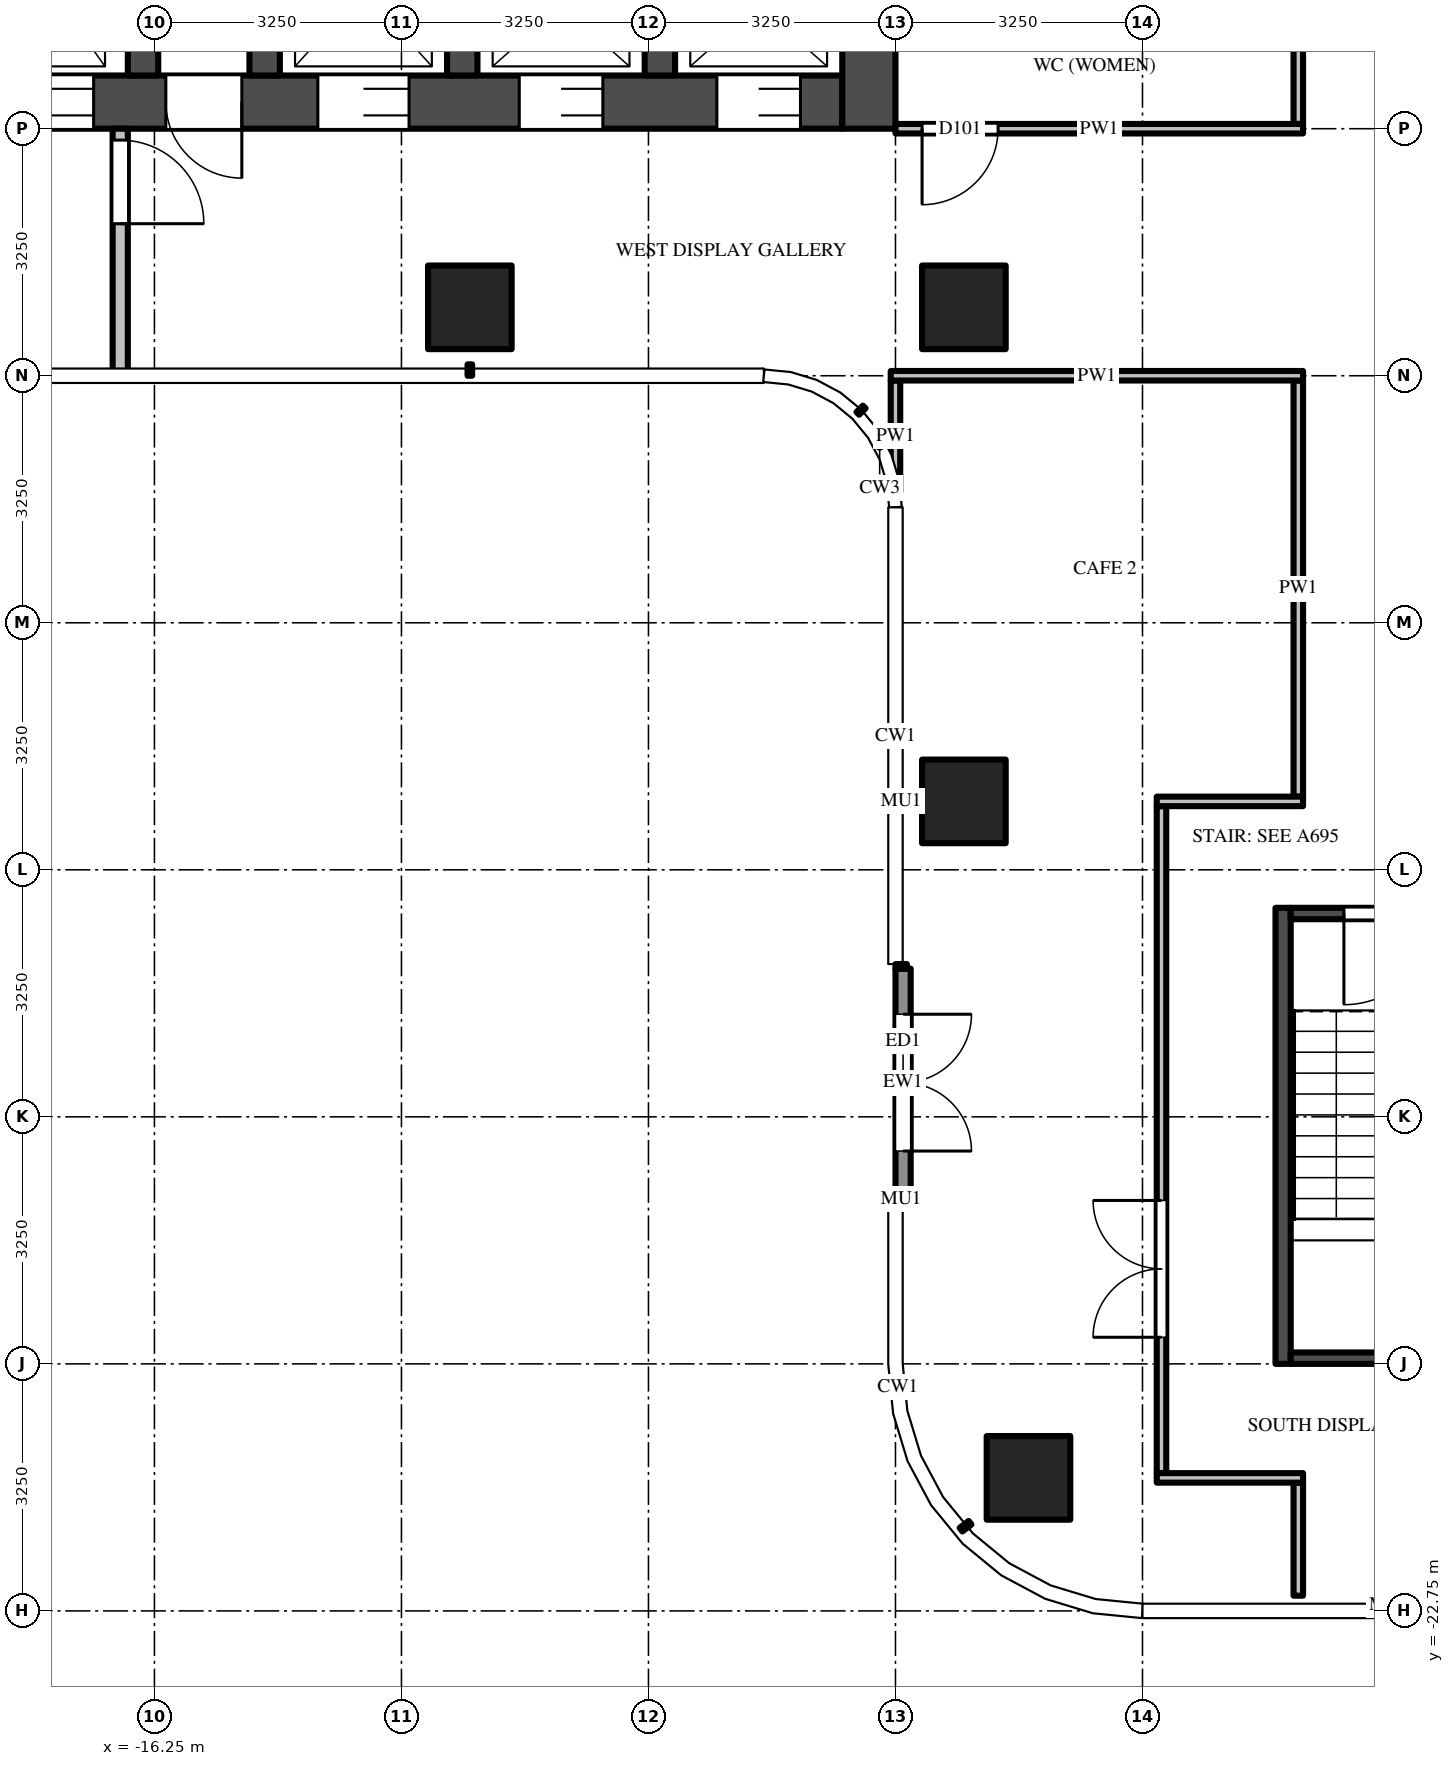
"""IFC4 building model, lengths in metres.
Left out: names, types, materials, properties, quantities, classifications, styles, units other than length and angle.
Written with IfcOpenShell. Run it as: python <this file> out.ifc"""

import sys

from ifc_helpers import new_model, si_unit, direction, frame, frame_2d, origin, origin_2d, place, context, subcontext, project, spatial, polyline, rectangle, outline, extrude, source, transform, mapped, element, fill, save


model = new_model("IFC4")
c1 = context("Model", 3, precision=1e-05, world=origin(), true_north=direction((0.0, 1.0)))
c2 = subcontext(c1, "Body", "Model", "MODEL_VIEW")
j1 = project(units=[si_unit("LENGTHUNIT", "METRE"), si_unit("PLANEANGLEUNIT", "RADIAN")], contexts=[c1])
p1 = place(None, origin())
s1 = spatial("IfcSite", under=j1, at=p1, CompositionType="ELEMENT")
p2 = place(p1, origin())
s2 = spatial("IfcBuilding", under=s1, at=p2, CompositionType="ELEMENT")
p3 = place(p2, frame((0.0, 0.0, 248.0)))
s3 = spatial("IfcBuildingStorey", under=s2, at=p3, CompositionType="ELEMENT", Elevation=248.0)
m1 = source(origin(), c2, "Body", "SweptSolid", [
    extrude(rectangle(XDim=1.1, YDim=1.1, at=origin_2d()), origin(), (0.0, 0.0, 1.0), 3.9),
])
for number, where, z_axis, x_axis in (
    (1, (-5.6, -5.6, 0.0), (0.0, 0.0, 1.0), (1.0, 0.0, 0.0)),
    (2, (-5.6, -12.1, 0.0), (0.0, 0.0, 1.0), (1.0, 0.0, 0.0)),
    (3, (-4.75, -21.0, 0.0), (0.0, 0.0, 1.0), (1.0, 0.0, 0.0)),
    (4, (-12.1, -5.6, 0.0), (0.0, 0.0, 1.0), (1.0, 0.0, 0.0)),
):
    element("IfcColumn", number, at=place(p3, frame(where, z_axis=z_axis, x_axis=x_axis)), inside=s3, PredefinedType="COLUMN", context=c2, shape_type="MappedRepresentation", body=[
        mapped(m1, transform((0.0, 0.0, 0.0))),
    ])
m2 = source(origin(), c2, "Body", "SweptSolid", [
    extrude(rectangle(XDim=14.85, YDim=0.7, at=frame_2d((7.425, 0.0))), origin(), (0.0, 0.0, 1.0), 3.7),
])
p4 = place(p3, frame((-7.2, -2.9, 0.0), z_axis=(0.0, 0.0, 1.0), x_axis=(-1.0, 0.0, 0.0)))
e5 = element("IfcWall", 5, at=p4, inside=s3, PredefinedType="SHEAR", context=c2, shape_type="MappedRepresentation", body=[
    mapped(m2, transform((0.0, 0.0, 0.0))),
])
m3 = source(origin(), c2, "Body", "SweptSolid", [
    extrude(rectangle(XDim=1.1, YDim=2.1, at=frame_2d((0.55, 1.05))), frame((0.0, 0.36, 0.0), z_axis=(0.0, -1.0, 0.0), x_axis=(1.0, 0.0, 0.0)), (0.0, 0.0, 1.0), 0.72),
])
p5 = place(p4, frame((0.55, 0.0, 0.0)))
e6 = element("IfcOpeningElement", 6, at=p5, cuts=e5, PredefinedType="OPENING", context=c2, shape_type="MappedRepresentation", body=[
    mapped(m3, transform((0.0, 0.0, 0.0))),
])
p6 = place(p4, frame((3.15, 0.0, 0.0)))
e7 = element("IfcOpeningElement", 7, at=p6, cuts=e5, PredefinedType="OPENING", context=c2, shape_type="MappedRepresentation", body=[
    mapped(m3, transform((0.0, 0.0, 0.0))),
])
m4 = source(origin(), c2, "Body", "SweptSolid", [
    extrude(rectangle(XDim=1.2, YDim=2.1, at=frame_2d((0.6, 1.05))), frame((0.0, 0.36, 0.0), z_axis=(0.0, -1.0, 0.0), x_axis=(1.0, 0.0, 0.0)), (0.0, 0.0, 1.0), 0.72),
])
p7 = place(p4, frame((5.7, 0.0, 0.0)))
e8 = element("IfcOpeningElement", 8, at=p7, cuts=e5, PredefinedType="OPENING", context=c2, shape_type="MappedRepresentation", body=[
    mapped(m4, transform((0.0, 0.0, 0.0))),
])
m5 = source(origin(), c2, "Body", "SweptSolid", [
    extrude(rectangle(XDim=1.3, YDim=2.1, at=frame_2d((0.65, 1.05))), frame((0.0, 0.36, 0.0), z_axis=(0.0, -1.0, 0.0), x_axis=(1.0, 0.0, 0.0)), (0.0, 0.0, 1.0), 0.72),
])
p8 = place(p4, frame((12.2, 0.0, 0.0)))
e9 = element("IfcOpeningElement", 9, at=p8, cuts=e5, PredefinedType="OPENING", context=c2, shape_type="MappedRepresentation", body=[
    mapped(m5, transform((0.0, 0.0, 0.0))),
])
p9 = place(p4, frame((9.85, 0.0, 0.0)))
e10 = element("IfcOpeningElement", 10, at=p9, cuts=e5, PredefinedType="OPENING", context=c2, shape_type="MappedRepresentation", body=[
    mapped(m4, transform((0.0, 0.0, 0.0))),
])
m6 = source(origin(), c2, "Body", "SweptSolid", [
    extrude(rectangle(XDim=1.0, YDim=2.1, at=frame_2d((0.5, 1.05))), frame((0.0, 0.36, 0.0), z_axis=(0.0, -1.0, 0.0), x_axis=(1.0, 0.0, 0.0)), (0.0, 0.0, 1.0), 0.72),
])
p10 = place(p4, frame((7.9, 0.0, 0.0)))
e11 = element("IfcOpeningElement", 11, at=p10, cuts=e5, PredefinedType="OPENING", context=c2, shape_type="MappedRepresentation", body=[
    mapped(m6, transform((0.0, 0.0, 0.0))),
])
m7 = source(origin(), c2, "Body", "SweptSolid", [
    extrude(rectangle(XDim=9.05, YDim=0.7, at=frame_2d((4.525, 0.0))), origin(), (0.0, 0.0, 1.0), 3.7),
])
p11 = place(p3, frame((-6.85, 5.8, 0.0), z_axis=(0.0, 0.0, 1.0), x_axis=(0.0, -1.0, 0.0)))
e12 = element("IfcWall", 12, at=p11, inside=s3, PredefinedType="SHEAR", context=c2, shape_type="MappedRepresentation", body=[
    mapped(m7, transform((0.0, 0.0, 0.0))),
])
m8 = source(origin(), c2, "Body", "SweptSolid", [
    extrude(rectangle(XDim=1.8, YDim=2.1, at=frame_2d((0.9, 1.05))), frame((0.0, 0.36, 0.0), z_axis=(0.0, -1.0, 0.0), x_axis=(1.0, 0.0, 0.0)), (0.0, 0.0, 1.0), 0.72),
])
p12 = place(p11, frame((3.15, 0.0, 0.0)))
e13 = element("IfcOpeningElement", 13, at=p12, cuts=e12, PredefinedType="OPENING", context=c2, shape_type="MappedRepresentation", body=[
    mapped(m8, transform((0.0, 0.0, 0.0))),
])
m9 = source(origin(), c2, "Body", "SweptSolid", [
    extrude(rectangle(XDim=2.45, YDim=0.4, at=frame_2d((1.225, 0.0))), origin(), (0.0, 0.0, 1.0), 3.7),
])
for number, where, z_axis, x_axis in (
    (14, (-9.6, -0.1, 0.0), (0.0, 0.0, 1.0), (0.0, -1.0, 0.0)),
    (15, (-12.2, -0.1, 0.0), (0.0, 0.0, 1.0), (0.0, -1.0, 0.0)),
    (16, (-14.8, -0.1, 0.0), (0.0, 0.0, 1.0), (0.0, -1.0, 0.0)),
    (17, (-16.4, -0.1, 0.0), (0.0, 0.0, 1.0), (0.0, -1.0, 0.0)),
):
    element("IfcWall", number, at=place(p3, frame(where, z_axis=z_axis, x_axis=x_axis)), inside=s3, PredefinedType="SHEAR", context=c2, shape_type="MappedRepresentation", body=[
        mapped(m9, transform((0.0, 0.0, 0.0))),
    ])
m10 = source(origin(), c2, "Body", "SweptSolid", [
    extrude(rectangle(XDim=3.25, YDim=0.2, at=frame_2d((1.625, 0.0))), origin(), (0.0, 0.0, 1.0), 3.7),
])
p13 = place(p3, frame((-16.7, -3.25, 0.0), z_axis=(0.0, 0.0, 1.0), x_axis=(0.0, -1.0, 0.0)))
e18 = element("IfcWall", 18, at=p13, inside=s3, PredefinedType="PARTITIONING", context=c2, shape_type="MappedRepresentation", body=[
    mapped(m10, transform((0.0, 0.0, 0.0))),
])
m11 = source(origin(), c2, "Body", "SweptSolid", [
    extrude(rectangle(XDim=1.1, YDim=2.1, at=frame_2d((0.55, 1.05))), frame((0.0, 0.11, 0.0), z_axis=(0.0, -1.0, 0.0), x_axis=(1.0, 0.0, 0.0)), (0.0, 0.0, 1.0), 0.22),
])
p14 = place(p13, frame((0.15, 0.0, 0.0)))
e19 = element("IfcOpeningElement", 19, at=p14, cuts=e18, PredefinedType="OPENING", context=c2, shape_type="MappedRepresentation", body=[
    mapped(m11, transform((0.0, 0.0, 0.0))),
])
m12 = source(origin(), c2, "Body", "SweptSolid", [
    extrude(rectangle(XDim=6.0, YDim=0.2, at=frame_2d((3.0, 0.0))), origin(), (0.0, 0.0, 1.0), 3.7),
])
p15 = place(p3, frame((-1.4, -13.5, 0.0), z_axis=(0.0, 0.0, 1.0), x_axis=(0.0, -1.0, 0.0)))
e20 = element("IfcWall", 20, at=p15, inside=s3, PredefinedType="SHEAR", context=c2, shape_type="MappedRepresentation", body=[
    mapped(m12, transform((0.0, 0.0, 0.0))),
])
m13 = source(origin(), c2, "Body", "SweptSolid", [
    extrude(rectangle(XDim=2.6, YDim=0.15, at=frame_2d((1.3, 0.0))), origin(), (0.0, 0.0, 1.0), 3.7),
])
p16 = place(p3, frame((1.3, -13.575, 0.0), z_axis=(0.0, 0.0, 1.0), x_axis=(-1.0, 0.0, 0.0)))
e21 = element("IfcWall", 21, at=p16, inside=s3, PredefinedType="SHEAR", context=c2, shape_type="MappedRepresentation", body=[
    mapped(m13, transform((0.0, 0.0, 0.0))),
])
m14 = source(origin(), c2, "Body", "SweptSolid", [
    extrude(rectangle(XDim=1.2, YDim=2.1, at=frame_2d((0.6, 1.05))), frame((0.0, 0.085, 0.0), z_axis=(0.0, -1.0, 0.0), x_axis=(1.0, 0.0, 0.0)), (0.0, 0.0, 1.0), 0.17),
])
p17 = place(p16, frame((0.7, 0.0, 0.0)))
e22 = element("IfcOpeningElement", 22, at=p17, cuts=e21, PredefinedType="OPENING", context=c2, shape_type="MappedRepresentation", body=[
    mapped(m14, transform((0.0, 0.0, 0.0))),
])
p18 = place(p3, frame((1.3, -19.425, 0.0), z_axis=(0.0, 0.0, 1.0), x_axis=(-1.0, 0.0, 0.0)))
e23 = element("IfcWall", 23, at=p18, inside=s3, PredefinedType="SHEAR", context=c2, shape_type="MappedRepresentation", body=[
    mapped(m13, transform((0.0, 0.0, 0.0))),
])
m15 = source(origin(), c2, "Body", "SweptSolid", [
    extrude(rectangle(XDim=3.0, YDim=0.2, at=frame_2d((1.5, 0.0))), origin(), (0.0, 0.0, 1.0), 3.7),
])
p19 = place(p3, frame((-6.4, -14.3, 0.0), z_axis=(0.0, 0.0, 1.0), x_axis=(0.0, -1.0, 0.0)))
e24 = element("IfcWall", 24, at=p19, inside=s3, PredefinedType="SOLIDWALL", context=c2, shape_type="MappedRepresentation", body=[
    mapped(m15, transform((0.0, 0.0, 0.0))),
])
m16 = source(origin(), c2, "Body", "SweptSolid", [
    extrude(rectangle(XDim=1.8, YDim=2.4, at=frame_2d((0.9, 1.2))), frame((0.0, 0.11, 0.0), z_axis=(0.0, -1.0, 0.0), x_axis=(1.0, 0.0, 0.0)), (0.0, 0.0, 1.0), 0.22),
])
p20 = place(p19, frame((0.6, 0.0, 0.0)))
e25 = element("IfcOpeningElement", 25, at=p20, cuts=e24, PredefinedType="OPENING", context=c2, shape_type="MappedRepresentation", body=[
    mapped(m16, transform((0.0, 0.0, 0.0))),
])
p21 = place(p3, origin())
e26 = element("IfcWall", 26, at=p21, inside=s3, PredefinedType="USERDEFINED", context=c2, shape_type="SweptSolid", body=[
    extrude(outline(polyline([(-16.429, -8.882), (-17.351, -8.859), (-18.106, -8.693), (-17.977, -8.107), (-17.279, -8.26), (-16.473, -8.281), (-15.681, -8.143), (-15.603, -8.116), (-15.409, -8.684), (-15.532, -8.726), (-16.429, -8.882)])), origin(), (0.0, 0.0, 1.0), 0.5),
])
m17 = source(origin(), c2, "Body", "SweptSolid", [
    extrude(rectangle(XDim=1.469, YDim=0.125, at=frame_2d((0.734, 0.0))), origin(), (0.0, 0.0, 1.0), 3.7),
])
p22 = place(p3, frame((-6.5, -6.562, 0.0), z_axis=(0.0, 0.0, 1.0), x_axis=(0.0, -1.0, 0.0)))
e27 = element("IfcWall", 27, at=p22, inside=s3, PredefinedType="PARTITIONING", context=c2, shape_type="MappedRepresentation", body=[
    mapped(m17, transform((0.0, 0.0, 0.0))),
])
m18 = source(origin(), c2, "Body", "SweptSolid", [
    extrude(rectangle(XDim=8.775, YDim=0.125, at=frame_2d((4.387, 0.0))), origin(), (0.0, 0.0, 1.0), 2.78),
])
p23 = place(p3, frame((-3.0, -20.938, 0.0), z_axis=(0.0, 0.0, 1.0), x_axis=(0.0, 1.0, 0.0)))
e28 = element("IfcWall", 28, at=p23, inside=s3, PredefinedType="PARTITIONING", context=c2, shape_type="MappedRepresentation", body=[
    mapped(m18, transform((0.0, 0.0, 0.0))),
])
m19 = source(origin(), c2, "Body", "SweptSolid", [
    extrude(rectangle(XDim=1.8, YDim=2.1, at=frame_2d((0.9, 1.05))), frame((0.0, 0.073, 0.0), z_axis=(0.0, -1.0, 0.0), x_axis=(1.0, 0.0, 0.0)), (0.0, 0.0, 1.0), 0.145),
])
p24 = place(p23, frame((1.788, 0.0, 0.0)))
e29 = element("IfcOpeningElement", 29, at=p24, cuts=e28, PredefinedType="OPENING", context=c2, shape_type="MappedRepresentation", body=[
    mapped(m19, transform((0.0, 0.0, 0.0))),
])
m20 = source(origin(), c2, "Body", "SweptSolid", [
    extrude(rectangle(XDim=1.488, YDim=0.125, at=frame_2d((0.744, 0.0))), origin(), (0.0, 0.0, 1.0), 2.78),
])
p25 = place(p3, frame((-1.2, -21.062, 0.0), z_axis=(0.0, 0.0, 1.0), x_axis=(0.0, -1.0, 0.0)))
e30 = element("IfcWall", 30, at=p25, inside=s3, PredefinedType="PARTITIONING", context=c2, shape_type="MappedRepresentation", body=[
    mapped(m20, transform((0.0, 0.0, 0.0))),
])
m21 = source(origin(), c2, "Body", "SweptSolid", [
    extrude(rectangle(XDim=5.475, YDim=0.125, at=frame_2d((2.738, 0.0))), origin(), (0.0, 0.0, 1.0), 2.997),
])
p26 = place(p3, frame((-1.2, -6.562, 0.0), z_axis=(0.0, 0.0, 1.0), x_axis=(0.0, -1.0, 0.0)))
e31 = element("IfcWall", 31, at=p26, inside=s3, PredefinedType="PARTITIONING", context=c2, shape_type="MappedRepresentation", body=[
    mapped(m21, transform((0.0, 0.0, 0.0))),
])
m22 = source(origin(), c2, "Body", "SweptSolid", [
    extrude(rectangle(XDim=3.125, YDim=0.125, at=frame_2d((1.562, 0.0))), origin(), (0.0, 0.0, 1.0), 3.068),
])
p27 = place(p3, frame((-1.2, -0.062, 0.0), z_axis=(0.0, 0.0, 1.0), x_axis=(0.0, -1.0, 0.0)))
e32 = element("IfcWall", 32, at=p27, inside=s3, PredefinedType="PARTITIONING", context=c2, shape_type="MappedRepresentation", body=[
    mapped(m22, transform((0.0, 0.0, 0.0))),
])
m23 = source(origin(), c2, "Body", "SweptSolid", [
    extrude(rectangle(XDim=1.925, YDim=0.125, at=frame_2d((0.962, 0.0))), origin(), (0.0, 0.0, 1.0), 2.78),
])
p28 = place(p3, frame((-1.137, -21.0, 0.0), z_axis=(0.0, 0.0, 1.0), x_axis=(-1.0, 0.0, 0.0)))
e33 = element("IfcWall", 33, at=p28, inside=s3, PredefinedType="PARTITIONING", context=c2, shape_type="MappedRepresentation", body=[
    mapped(m23, transform((0.0, 0.0, 0.0))),
])
m24 = source(origin(), c2, "Body", "SweptSolid", [
    extrude(rectangle(XDim=1.925, YDim=0.125, at=frame_2d((0.962, 0.0))), origin(), (0.0, 0.0, 1.0), 2.997),
])
p29 = place(p3, frame((-3.062, -12.1, 0.0), z_axis=(0.0, 0.0, 1.0), x_axis=(1.0, 0.0, 0.0)))
e34 = element("IfcWall", 34, at=p29, inside=s3, PredefinedType="PARTITIONING", context=c2, shape_type="MappedRepresentation", body=[
    mapped(m24, transform((0.0, 0.0, 0.0))),
])
m25 = source(origin(), c2, "Body", "SweptSolid", [
    extrude(rectangle(XDim=5.425, YDim=0.125, at=frame_2d((2.712, 0.0))), origin(), (0.0, 0.0, 1.0), 2.78),
])
p30 = place(p3, frame((-1.137, -6.5, 0.0), z_axis=(0.0, 0.0, 1.0), x_axis=(-1.0, 0.0, 0.0)))
e35 = element("IfcWall", 35, at=p30, inside=s3, PredefinedType="PARTITIONING", context=c2, shape_type="MappedRepresentation", body=[
    mapped(m25, transform((0.0, 0.0, 0.0))),
])
m26 = source(origin(), c2, "Body", "SweptSolid", [
    extrude(rectangle(XDim=5.363, YDim=0.125, at=frame_2d((2.681, 0.0))), origin(), (0.0, 0.0, 1.0), 2.997),
])
p31 = place(p3, frame((-1.137, -3.25, 0.0), z_axis=(0.0, 0.0, 1.0), x_axis=(-1.0, 0.0, 0.0)))
e36 = element("IfcWall", 36, at=p31, inside=s3, PredefinedType="PARTITIONING", context=c2, shape_type="MappedRepresentation", body=[
    mapped(m26, transform((0.0, 0.0, 0.0))),
])
m27 = source(origin(), c2, "Body", "SweptSolid", [
    extrude(rectangle(XDim=1.0, YDim=2.1, at=frame_2d((0.5, 1.05))), frame((0.0, 0.073, 0.0), z_axis=(0.0, -1.0, 0.0), x_axis=(1.0, 0.0, 0.0)), (0.0, 0.0, 1.0), 0.145),
])
p32 = place(p31, frame((4.012, 0.0, 0.0)))
e37 = element("IfcOpeningElement", 37, at=p32, cuts=e36, PredefinedType="OPENING", context=c2, shape_type="MappedRepresentation", body=[
    mapped(m27, transform((0.0, 0.0, 0.0))),
])
m28 = source(origin(), c2, "Body", "SweptSolid", [
    extrude(rectangle(XDim=1.1, YDim=2.1, at=frame_2d((0.55, 1.05))), frame((0.0, -0.275, 0.0), z_axis=(0.0, -1.0, 0.0), x_axis=(1.0, 0.0, 0.0)), (0.0, 0.0, 1.0), 0.05),
])
p33 = place(p5, origin())
e38 = element("IfcDoor", 38, at=p33, inside=s3, OperationType="DOUBLE_DOOR_SLIDING", PredefinedType="DOOR", context=c2, shape_type="MappedRepresentation", body=[
    mapped(m28, transform((0.0, 0.0, 0.0))),
])
fill(e6, e38)
p34 = place(p6, origin())
e39 = element("IfcDoor", 39, at=p34, inside=s3, OperationType="DOUBLE_DOOR_SLIDING", PredefinedType="DOOR", context=c2, shape_type="MappedRepresentation", body=[
    mapped(m28, transform((0.0, 0.0, 0.0))),
])
fill(e7, e39)
m29 = source(origin(), c2, "Body", "SweptSolid", [
    extrude(rectangle(XDim=1.2, YDim=2.1, at=frame_2d((0.6, 1.05))), frame((0.0, -0.275, 0.0), z_axis=(0.0, -1.0, 0.0), x_axis=(1.0, 0.0, 0.0)), (0.0, 0.0, 1.0), 0.05),
])
p35 = place(p7, origin())
e40 = element("IfcDoor", 40, at=p35, inside=s3, OperationType="DOUBLE_DOOR_SLIDING", PredefinedType="DOOR", context=c2, shape_type="MappedRepresentation", body=[
    mapped(m29, transform((0.0, 0.0, 0.0))),
])
fill(e8, e40)
p36 = place(p9, origin())
e41 = element("IfcDoor", 41, at=p36, inside=s3, OperationType="DOUBLE_DOOR_SLIDING", PredefinedType="DOOR", context=c2, shape_type="MappedRepresentation", body=[
    mapped(m29, transform((0.0, 0.0, 0.0))),
])
fill(e10, e41)
m30 = source(origin(), c2, "Body", "SweptSolid", [
    extrude(rectangle(XDim=1.0, YDim=2.1, at=frame_2d((0.5, 1.05))), frame((0.0, -0.275, 0.0), z_axis=(0.0, -1.0, 0.0), x_axis=(1.0, 0.0, 0.0)), (0.0, 0.0, 1.0), 0.05),
])
p37 = place(p10, origin())
e42 = element("IfcDoor", 42, at=p37, inside=s3, OperationType="SINGLE_SWING_LEFT", PredefinedType="DOOR", context=c2, shape_type="MappedRepresentation", body=[
    mapped(m30, transform((0.0, 0.0, 0.0))),
])
fill(e11, e42)
m31 = source(origin(), c2, "Body", "SweptSolid", [
    extrude(rectangle(XDim=1.1, YDim=2.1, at=frame_2d((0.55, 1.05))), frame((0.0, 0.025, 0.0), z_axis=(0.0, -1.0, 0.0), x_axis=(1.0, 0.0, 0.0)), (0.0, 0.0, 1.0), 0.05),
])
p38 = place(p14, origin())
e43 = element("IfcDoor", 43, at=p38, inside=s3, OperationType="SINGLE_SWING_RIGHT", PredefinedType="DOOR", context=c2, shape_type="MappedRepresentation", body=[
    mapped(m31, transform((0.0, 0.0, 0.0))),
])
fill(e19, e43)
m32 = source(origin(), c2, "Body", "SweptSolid", [
    extrude(rectangle(XDim=1.2, YDim=2.1, at=frame_2d((0.6, 1.05))), frame((0.0, 0.025, 0.0), z_axis=(0.0, -1.0, 0.0), x_axis=(1.0, 0.0, 0.0)), (0.0, 0.0, 1.0), 0.05),
])
p39 = place(p17, origin())
e44 = element("IfcDoor", 44, at=p39, inside=s3, OperationType="SINGLE_SWING_RIGHT", PredefinedType="DOOR", context=c2, shape_type="MappedRepresentation", body=[
    mapped(m32, transform((0.0, 0.0, 0.0))),
])
fill(e22, e44)
m33 = source(origin(), c2, "Body", "SweptSolid", [
    extrude(rectangle(XDim=1.8, YDim=2.4, at=frame_2d((0.9, 1.2))), frame((0.0, 0.025, 0.0), z_axis=(0.0, -1.0, 0.0), x_axis=(1.0, 0.0, 0.0)), (0.0, 0.0, 1.0), 0.05),
])
p40 = place(p20, origin())
e45 = element("IfcDoor", 45, at=p40, inside=s3, OperationType="DOUBLE_DOOR_SINGLE_SWING", PredefinedType="DOOR", context=c2, shape_type="MappedRepresentation", body=[
    mapped(m33, transform((0.0, 0.0, 0.0))),
])
fill(e25, e45)
m34 = source(origin(), c2, "Body", "SweptSolid", [
    extrude(rectangle(XDim=1.8, YDim=2.1, at=frame_2d((0.9, 1.05))), frame((0.0, 0.025, 0.0), z_axis=(0.0, -1.0, 0.0), x_axis=(1.0, 0.0, 0.0)), (0.0, 0.0, 1.0), 0.05),
])
p41 = place(p24, origin())
e46 = element("IfcDoor", 46, at=p41, inside=s3, OperationType="DOUBLE_DOOR_SINGLE_SWING", PredefinedType="DOOR", context=c2, shape_type="MappedRepresentation", body=[
    mapped(m34, transform((0.0, 0.0, 0.0))),
])
fill(e29, e46)
m35 = source(origin(), c2, "Body", "SweptSolid", [
    extrude(rectangle(XDim=1.0, YDim=2.1, at=frame_2d((0.5, 1.05))), frame((0.0, 0.025, 0.0), z_axis=(0.0, -1.0, 0.0), x_axis=(1.0, 0.0, 0.0)), (0.0, 0.0, 1.0), 0.05),
])
p42 = place(p32, origin())
e47 = element("IfcDoor", 47, at=p42, inside=s3, OperationType="SINGLE_SWING_RIGHT", PredefinedType="DOOR", context=c2, shape_type="MappedRepresentation", body=[
    mapped(m35, transform((0.0, 0.0, 0.0))),
])
fill(e37, e47)
save(model, sys.argv[1])
